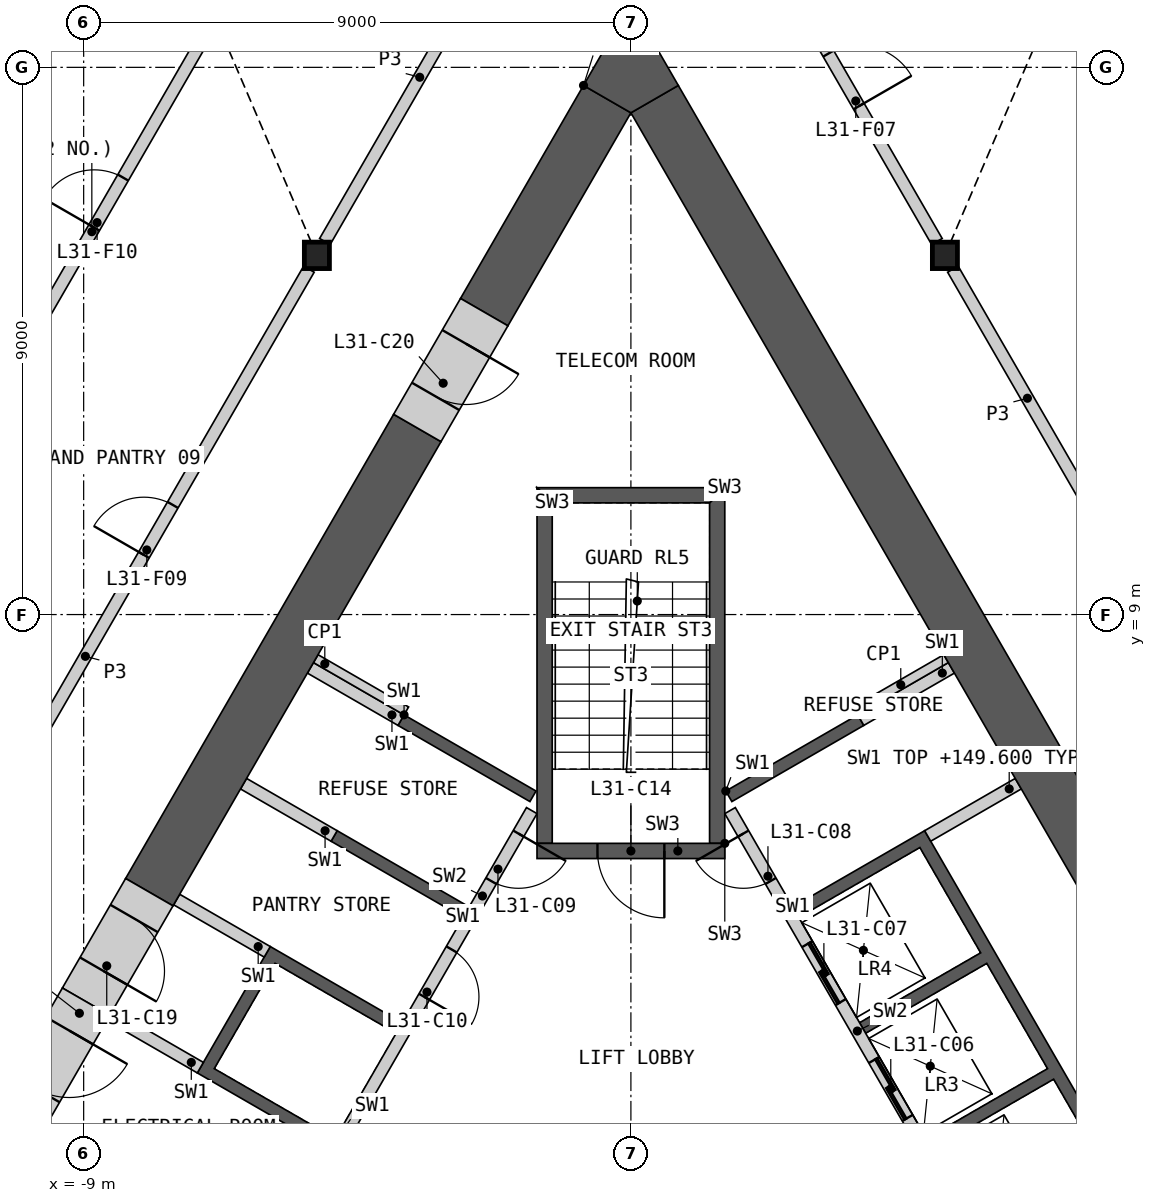
"""IFC4 building model, lengths in metres.
Left out: names, types, materials, properties, quantities, classifications, styles, units other than length and angle.
Written with IfcOpenShell. Run it as: python <this file> out.ifc"""

import sys

from ifc_helpers import new_model, si_unit, direction, frame, frame_2d, origin, origin_2d, place, context, subcontext, project, spatial, polyline, rectangle, i_section, outline, extrude, element, fill, save


model = new_model("IFC4")
c1 = context("Model", 3, precision=1e-05, world=origin(), true_north=direction((0.0, 1.0)))
c2 = subcontext(c1, "Body", "Model", "MODEL_VIEW")
j1 = project(units=[si_unit("LENGTHUNIT", "METRE"), si_unit("PLANEANGLEUNIT", "RADIAN")], contexts=[c1])
p1 = place(None, origin())
s1 = spatial("IfcSite", under=j1, at=p1, CompositionType="ELEMENT")
p2 = place(p1, origin())
s2 = spatial("IfcBuilding", under=s1, at=p2, CompositionType="ELEMENT")
p3 = place(p2, frame((0.0, 0.0, 145.8)))
s3 = spatial("IfcBuildingStorey", under=s2, at=p3, CompositionType="ELEMENT", Elevation=145.8)
for number, where, z_axis, x_axis in (
    (1, (-5.164, 14.908, 0.0), (0.0, 0.0, 1.0), (1.0, 0.0, 0.0)),
    (2, (5.164, 14.908, 0.0), (0.0, 0.0, 1.0), (1.0, 0.0, 0.0)),
):
    element("IfcColumn", number, at=place(p3, frame(where, z_axis=z_axis, x_axis=x_axis)), inside=s3, PredefinedType="COLUMN", context=c2, shape_type="SweptSolid", body=[
        extrude(i_section(OverallWidth=0.412, OverallDepth=0.435, WebThickness=0.036, FlangeThickness=0.057, at=origin_2d()), origin(), (0.0, 0.0, 1.0), 4.2),
    ])
p4 = place(p3, origin())
e3 = element("IfcWall", 3, at=p4, inside=s3, PredefinedType="SHEAR", context=c2, shape_type="SweptSolid", body=[
    extrude(outline(polyline([(1.561, 6.097), (3.731, 7.35), (3.831, 7.177), (1.66, 5.924), (1.561, 6.097)])), origin(), (0.0, 0.0, 1.0), 3.8),
])
p5 = place(p3, origin())
e4 = element("IfcWall", 4, at=p5, inside=s3, PredefinedType="SHEAR", context=c2, shape_type="SweptSolid", body=[
    extrude(outline(polyline([(2.66, 4.192), (4.831, 5.445), (8.231, -0.444), (6.061, -1.697), (5.96, -1.524), (7.952, -0.374), (6.952, 1.358), (4.96, 0.208), (4.861, 0.381), (6.852, 1.531), (5.852, 3.263), (3.861, 2.113), (3.76, 2.287), (5.752, 3.437), (4.752, 5.169), (2.76, 4.019), (2.66, 4.192)])), origin(), (0.0, 0.0, 1.0), 3.8),
])
p6 = place(p3, frame((5.817, -1.476, 0.0), z_axis=(0.0, 0.0, 1.0), x_axis=(-0.500002616675, 0.866023893041, 0.0)))
e5 = element("IfcWall", 5, at=p6, inside=s3, PredefinedType="SOLIDWALL", context=c2, shape_type="SweptSolid", body=[
    extrude(rectangle(XDim=8.373, YDim=0.2, at=frame_2d((4.187, 0.0))), origin(), (0.0, 0.0, 1.0), 3.8),
])
p7 = place(p6, frame((0.337, 0.0, 0.0)))
e6 = element("IfcOpeningElement", 6, at=p7, cuts=e5, PredefinedType="OPENING", context=c2, shape_type="SweptSolid", body=[
    extrude(rectangle(XDim=1.1, YDim=2.1, at=frame_2d((0.55, 1.05))), frame((0.0, 0.11, 0.0), z_axis=(0.0, -1.0, 0.0), x_axis=(1.0, 0.0, 0.0)), (0.0, 0.0, 1.0), 0.22),
])
p8 = place(p6, frame((2.537, 0.0, 0.0)))
e7 = element("IfcOpeningElement", 7, at=p8, cuts=e5, PredefinedType="OPENING", context=c2, shape_type="SweptSolid", body=[
    extrude(rectangle(XDim=1.1, YDim=2.1, at=frame_2d((0.55, 1.05))), frame((0.0, 0.11, 0.0), z_axis=(0.0, -1.0, 0.0), x_axis=(1.0, 0.0, 0.0)), (0.0, 0.0, 1.0), 0.22),
])
p9 = place(p6, frame((4.737, 0.0, 0.0)))
e8 = element("IfcOpeningElement", 8, at=p9, cuts=e5, PredefinedType="OPENING", context=c2, shape_type="SweptSolid", body=[
    extrude(rectangle(XDim=1.1, YDim=2.1, at=frame_2d((0.55, 1.05))), frame((0.0, 0.11, 0.0), z_axis=(0.0, -1.0, 0.0), x_axis=(1.0, 0.0, 0.0)), (0.0, 0.0, 1.0), 0.22),
])
p10 = place(p6, frame((7.037, 0.0, 0.0)))
e9 = element("IfcOpeningElement", 9, at=p10, cuts=e5, PredefinedType="OPENING", context=c2, shape_type="SweptSolid", body=[
    extrude(rectangle(XDim=0.9, YDim=2.1, at=frame_2d((0.45, 1.05))), frame((0.0, 0.11, 0.0), z_axis=(0.0, -1.0, 0.0), x_axis=(1.0, 0.0, 0.0)), (0.0, 0.0, 1.0), 0.22),
])
for number, where, z_axis, x_axis in (
    (10, (4.881, 5.358, 0.0), (0.0, 0.0, 1.0), (0.866, 0.5, 0.0)),
    (11, (3.781, 7.263, 0.0), (0.0, 0.0, 1.0), (0.866, 0.5, 0.0)),
):
    element("IfcWall", number, at=place(p3, frame(where, z_axis=z_axis, x_axis=x_axis)), inside=s3, PredefinedType="SHEAR", context=c2, shape_type="SweptSolid", body=[
        extrude(rectangle(XDim=1.72, YDim=0.2, at=frame_2d((0.86, 0.0))), origin(), (0.0, 0.0, 1.0), 3.8),
    ])
p11 = place(p3, origin())
e12 = element("IfcWall", 12, at=p11, inside=s3, PredefinedType="SHEAR", context=c2, shape_type="SweptSolid", body=[
    extrude(outline(polyline([(-4.96, 0.208), (-7.131, 1.461), (-5.931, 3.54), (-3.76, 2.287), (-3.861, 2.113), (-5.852, 3.263), (-6.852, 1.531), (-4.861, 0.381), (-4.96, 0.208)])), origin(), (0.0, 0.0, 1.0), 3.8),
])
p12 = place(p3, origin())
e13 = element("IfcWall", 13, at=p12, inside=s3, PredefinedType="SHEAR", context=c2, shape_type="SweptSolid", body=[
    extrude(outline(polyline([(-2.76, 4.019), (-4.931, 5.272), (-4.831, 5.445), (-2.66, 4.192), (-2.76, 4.019)])), origin(), (0.0, 0.0, 1.0), 3.8),
])
p13 = place(p3, origin())
e14 = element("IfcWall", 14, at=p13, inside=s3, PredefinedType="SHEAR", context=c2, shape_type="SweptSolid", body=[
    extrude(outline(polyline([(-3.731, 7.35), (-1.561, 6.097), (-1.66, 5.924), (-3.831, 7.177), (-3.731, 7.35)])), origin(), (0.0, 0.0, 1.0), 3.8),
])
p14 = place(p3, frame((-1.631, 5.776, 0.0), z_axis=(0.0, 0.0, 1.0), x_axis=(-0.499992876559, -0.866029516466, 0.0)))
e15 = element("IfcWall", 15, at=p14, inside=s3, PredefinedType="SOLIDWALL", context=c2, shape_type="SweptSolid", body=[
    extrude(rectangle(XDim=6.486, YDim=0.2, at=frame_2d((3.243, 0.0))), origin(), (0.0, 0.0, 1.0), 3.8),
])
p15 = place(p14, frame((0.437, 0.0, 0.0)))
e16 = element("IfcOpeningElement", 16, at=p15, cuts=e15, PredefinedType="OPENING", context=c2, shape_type="SweptSolid", body=[
    extrude(rectangle(XDim=0.9, YDim=2.1, at=frame_2d((0.45, 1.05))), frame((0.0, 0.11, 0.0), z_axis=(0.0, -1.0, 0.0), x_axis=(1.0, 0.0, 0.0)), (0.0, 0.0, 1.0), 0.22),
])
p16 = place(p14, frame((2.637, 0.0, 0.0)))
e17 = element("IfcOpeningElement", 17, at=p16, cuts=e15, PredefinedType="OPENING", context=c2, shape_type="SweptSolid", body=[
    extrude(rectangle(XDim=0.9, YDim=2.1, at=frame_2d((0.45, 1.05))), frame((0.0, 0.11, 0.0), z_axis=(0.0, -1.0, 0.0), x_axis=(1.0, 0.0, 0.0)), (0.0, 0.0, 1.0), 0.22),
])
for number, where, z_axis, x_axis in (
    (18, (-3.781, 7.263, 0.0), (0.0, 0.0, 1.0), (-0.866, 0.5, 0.0)),
    (19, (-4.881, 5.358, 0.0), (0.0, 0.0, 1.0), (-0.866, 0.5, 0.0)),
):
    element("IfcWall", number, at=place(p3, frame(where, z_axis=z_axis, x_axis=x_axis)), inside=s3, PredefinedType="SHEAR", context=c2, shape_type="SweptSolid", body=[
        extrude(rectangle(XDim=1.72, YDim=0.2, at=frame_2d((0.86, 0.0))), origin(), (0.0, 0.0, 1.0), 3.8),
    ])
p17 = place(p3, frame((-5.981, 3.453, 0.0), z_axis=(0.0, 0.0, 1.0), x_axis=(-0.866060346521, 0.499939472521, 0.0)))
e20 = element("IfcWall", 20, at=p17, inside=s3, PredefinedType="SHEAR", context=c2, shape_type="SweptSolid", body=[
    extrude(rectangle(XDim=1.72, YDim=0.2, at=frame_2d((0.86, 0.0))), origin(), (0.0, 0.0, 1.0), 3.8),
])
p18 = place(p3, frame((-7.081, 1.548, 0.0), z_axis=(0.0, 0.0, 1.0), x_axis=(-0.865963414263, 0.500107353632, 0.0)))
e21 = element("IfcWall", 21, at=p18, inside=s3, PredefinedType="SHEAR", context=c2, shape_type="SweptSolid", body=[
    extrude(rectangle(XDim=1.72, YDim=0.2, at=frame_2d((0.86, 0.0))), origin(), (0.0, 0.0, 1.0), 3.8),
])
p19 = place(p3, origin())
e22 = element("IfcWall", 22, at=p19, inside=s3, PredefinedType="SHEAR", context=c2, shape_type="SweptSolid", body=[
    extrude(outline(polyline([(1.544, 5.237), (1.544, 11.087), (1.294, 10.837), (1.294, 5.237), (1.544, 5.237)])), origin(), (0.0, 0.0, 1.0), 3.8),
])
p20 = place(p3, origin())
e23 = element("IfcWall", 23, at=p20, inside=s3, PredefinedType="SHEAR", context=c2, shape_type="SweptSolid", body=[
    extrude(outline(polyline([(1.544, 11.087), (-1.544, 11.087), (-1.294, 10.837), (1.294, 10.837), (1.544, 11.087)])), origin(), (0.0, 0.0, 1.0), 3.8),
])
p21 = place(p3, origin())
e24 = element("IfcWall", 24, at=p21, inside=s3, PredefinedType="SHEAR", context=c2, shape_type="SweptSolid", body=[
    extrude(outline(polyline([(-1.294, 10.837), (-1.544, 11.087), (-1.544, 5.237), (-1.294, 5.237), (-1.294, 10.837)])), origin(), (0.0, 0.0, 1.0), 3.8),
])
p22 = place(p3, frame((1.544, 5.112, 0.0), z_axis=(0.0, 0.0, 1.0), x_axis=(-1.0, 0.0, 0.0)))
e25 = element("IfcWall", 25, at=p22, inside=s3, PredefinedType="SHEAR", context=c2, shape_type="SweptSolid", body=[
    extrude(rectangle(XDim=3.088, YDim=0.25, at=frame_2d((1.544, 0.0))), origin(), (0.0, 0.0, 1.0), 3.8),
])
p23 = place(p22, frame((0.994, 0.0, 0.0)))
e26 = element("IfcOpeningElement", 26, at=p23, cuts=e25, PredefinedType="OPENING", context=c2, shape_type="SweptSolid", body=[
    extrude(rectangle(XDim=1.1, YDim=2.1, at=frame_2d((0.55, 1.05))), frame((0.0, 0.135, 0.0), z_axis=(0.0, -1.0, 0.0), x_axis=(1.0, 0.0, 0.0)), (0.0, 0.0, 1.0), 0.27),
])
for number, where, z_axis, x_axis in (
    (27, (3.693, 7.415, 0.0), (0.0, 0.0, 1.0), (0.866, 0.5, 0.0)),
    (28, (-3.693, 7.415, 0.0), (0.0, 0.0, 1.0), (-0.866, 0.5, 0.0)),
):
    element("IfcWall", number, at=place(p3, frame(where, z_axis=z_axis, x_axis=x_axis)), inside=s3, PredefinedType="PARTITIONING", context=c2, shape_type="SweptSolid", body=[
        extrude(rectangle(XDim=1.72, YDim=0.15, at=frame_2d((0.86, 0.0))), origin(), (0.0, 0.0, 1.0), 3.8),
    ])
p24 = place(p3, frame((8.372, 3.652, 0.0), z_axis=(0.0, 0.0, 1.0), x_axis=(-0.499997808738, 0.866026668906, 0.0)))
e29 = element("IfcWall", 29, at=p24, inside=s3, PredefinedType="SHEAR", context=c2, shape_type="SweptSolid", body=[
    extrude(rectangle(XDim=15.964, YDim=0.9, at=frame_2d((7.982, 0.0))), origin(), (0.0, 0.0, 1.0), 3.8),
])
p25 = place(p3, frame((-3.512, 12.069, 0.0), z_axis=(0.0, 0.0, 1.0), x_axis=(-0.500002126466, -0.866024176065, 0.0)))
e30 = element("IfcWall", 30, at=p25, inside=s3, PredefinedType="SHEAR", context=c2, shape_type="SweptSolid", body=[
    extrude(rectangle(XDim=8.816, YDim=0.9, at=frame_2d((4.408, 0.0))), origin(), (0.0, 0.0, 1.0), 3.8),
])
p26 = place(p3, frame((-0.39, 17.478, 0.0), z_axis=(0.0, 0.0, 1.0), x_axis=(-0.500046330384, -0.865998653272, 0.0)))
e31 = element("IfcWall", 31, at=p26, inside=s3, PredefinedType="SHEAR", context=c2, shape_type="SweptSolid", body=[
    extrude(rectangle(XDim=4.045, YDim=0.9, at=frame_2d((2.023, 0.0))), origin(), (0.0, 0.0, 1.0), 3.8),
])
p27 = place(p3, origin())
e32 = element("IfcWall", 32, at=p27, inside=s3, PredefinedType="SHEAR", context=c2, shape_type="SweptSolid", body=[
    extrude(outline(polyline([(-0.779, 17.703), (0.0, 19.052), (0.779, 17.703), (0.0, 17.253), (-0.779, 17.703)])), origin(), (0.0, 0.0, 1.0), 3.8),
])
p28 = place(p3, frame((-7.92, 4.434, 0.0), z_axis=(0.0, 0.0, 1.0), x_axis=(-0.499939227269, -0.866060488094, 0.0)))
e33 = element("IfcWall", 33, at=p28, inside=s3, PredefinedType="SHEAR", context=c2, shape_type="SweptSolid", body=[
    extrude(rectangle(XDim=2.08, YDim=0.9, at=frame_2d((1.04, 0.0))), origin(), (0.0, 0.0, 1.0), 3.8),
])
p29 = place(p28, frame((0.5, 0.0, 0.0)))
e34 = element("IfcOpeningElement", 34, at=p29, cuts=e33, PredefinedType="OPENING", context=c2, shape_type="SweptSolid", body=[
    extrude(rectangle(XDim=1.0, YDim=2.1, at=frame_2d((0.5, 1.05))), frame((0.0, 0.46, 0.0), z_axis=(0.0, -1.0, 0.0), x_axis=(1.0, 0.0, 0.0)), (0.0, 0.0, 1.0), 0.92),
])
p30 = place(p3, frame((-2.413, 13.974, 0.0), z_axis=(0.0, 0.0, 1.0), x_axis=(-0.499946605688, -0.86605622881, 0.0)))
e35 = element("IfcWall", 35, at=p30, inside=s3, PredefinedType="SHEAR", context=c2, shape_type="SweptSolid", body=[
    extrude(rectangle(XDim=2.2, YDim=0.9, at=frame_2d((1.1, 0.0))), origin(), (0.0, 0.0, 1.0), 3.8),
])
p31 = place(p30, frame((0.6, 0.0, 0.0)))
e36 = element("IfcOpeningElement", 36, at=p31, cuts=e35, PredefinedType="OPENING", context=c2, shape_type="SweptSolid", body=[
    extrude(rectangle(XDim=1.0, YDim=2.1, at=frame_2d((0.5, 1.05))), frame((0.0, 0.46, 0.0), z_axis=(0.0, -1.0, 0.0), x_axis=(1.0, 0.0, 0.0)), (0.0, 0.0, 1.0), 0.92),
])
p32 = place(p3, frame((-8.96, 2.633, 0.0), z_axis=(0.0, 0.0, 1.0), x_axis=(-0.50002983664, -0.866008176907, 0.0)))
e37 = element("IfcWall", 37, at=p32, inside=s3, PredefinedType="SHEAR", context=c2, shape_type="SweptSolid", body=[
    extrude(rectangle(XDim=2.2, YDim=0.9, at=frame_2d((1.1, 0.0))), origin(), (0.0, 0.0, 1.0), 3.8),
])
p33 = place(p32, frame((0.55, 0.0, 0.0)))
e38 = element("IfcOpeningElement", 38, at=p33, cuts=e37, PredefinedType="OPENING", context=c2, shape_type="SweptSolid", body=[
    extrude(rectangle(XDim=1.1, YDim=2.1, at=frame_2d((0.55, 1.05))), frame((0.0, 0.46, 0.0), z_axis=(0.0, -1.0, 0.0), x_axis=(1.0, 0.0, 0.0)), (0.0, 0.0, 1.0), 0.92),
])
p34 = place(p3, frame((5.295, 14.68, 0.0), z_axis=(0.0, 0.0, 1.0), x_axis=(0.500012035596, -0.866018454918, 0.0)))
e39 = element("IfcWall", 39, at=p34, inside=s3, PredefinedType="PARTITIONING", context=c2, shape_type="SweptSolid", body=[
    extrude(rectangle(XDim=9.803, YDim=0.2, at=frame_2d((4.902, 0.0))), origin(), (0.0, 0.0, 1.0), 3.8),
])
p35 = place(p34, frame((6.853, 0.0, 0.0)))
e40 = element("IfcOpeningElement", 40, at=p35, cuts=e39, PredefinedType="OPENING", context=c2, shape_type="SweptSolid", body=[
    extrude(rectangle(XDim=1.0, YDim=2.1, at=frame_2d((0.5, 1.05))), frame((0.0, 0.11, 0.0), z_axis=(0.0, -1.0, 0.0), x_axis=(1.0, 0.0, 0.0)), (0.0, 0.0, 1.0), 0.22),
])
p36 = place(p3, frame((-10.197, 6.19, 0.0), z_axis=(0.0, 0.0, 1.0), x_axis=(0.500012035596, 0.866018454918, 0.0)))
e41 = element("IfcWall", 41, at=p36, inside=s3, PredefinedType="PARTITIONING", context=c2, shape_type="SweptSolid", body=[
    extrude(rectangle(XDim=9.803, YDim=0.2, at=frame_2d((4.902, 0.0))), origin(), (0.0, 0.0, 1.0), 3.8),
])
p37 = place(p36, frame((4.376, 0.0, 0.0)))
e42 = element("IfcOpeningElement", 42, at=p37, cuts=e41, PredefinedType="OPENING", context=c2, shape_type="SweptSolid", body=[
    extrude(rectangle(XDim=0.95, YDim=2.1, at=frame_2d((0.475, 1.05))), frame((0.0, 0.11, 0.0), z_axis=(0.0, -1.0, 0.0), x_axis=(1.0, 0.0, 0.0)), (0.0, 0.0, 1.0), 0.22),
])
p38 = place(p3, frame((-5.033, 15.135, 0.0), z_axis=(0.0, 0.0, 1.0), x_axis=(0.499980978912, 0.866036385336, 0.0)))
e43 = element("IfcWall", 43, at=p38, inside=s3, PredefinedType="PARTITIONING", context=c2, shape_type="SweptSolid", body=[
    extrude(rectangle(XDim=6.24, YDim=0.2, at=frame_2d((3.12, 0.0))), origin(), (0.0, 0.0, 1.0), 3.8),
])
p39 = place(p3, frame((1.913, 20.539, 0.0), z_axis=(0.0, 0.0, 1.0), x_axis=(0.499980978912, -0.866036385336, 0.0)))
e44 = element("IfcWall", 44, at=p39, inside=s3, PredefinedType="PARTITIONING", context=c2, shape_type="SweptSolid", body=[
    extrude(rectangle(XDim=6.24, YDim=0.2, at=frame_2d((3.12, 0.0))), origin(), (0.0, 0.0, 1.0), 3.8),
])
p40 = place(p39, frame((2.67, 0.0, 0.0)))
e45 = element("IfcOpeningElement", 45, at=p40, cuts=e44, PredefinedType="OPENING", context=c2, shape_type="SweptSolid", body=[
    extrude(rectangle(XDim=1.0, YDim=2.1, at=frame_2d((0.5, 1.05))), frame((0.0, 0.11, 0.0), z_axis=(0.0, -1.0, 0.0), x_axis=(1.0, 0.0, 0.0)), (0.0, 0.0, 1.0), 0.22),
])
p41 = place(p3, frame((-13.223, 7.75, 0.0), z_axis=(0.0, 0.0, 1.0), x_axis=(0.499991226912, 0.86603046887, 0.0)))
e46 = element("IfcWall", 46, at=p41, inside=s3, PredefinedType="PARTITIONING", context=c2, shape_type="SweptSolid", body=[
    extrude(rectangle(XDim=17.429, YDim=0.2, at=frame_2d((8.715, 0.0))), origin(), (0.0, 0.0, 1.0), 2.885),
])
p42 = place(p41, frame((8.792, 0.0, 0.0)))
e47 = element("IfcOpeningElement", 47, at=p42, cuts=e46, PredefinedType="OPENING", context=c2, shape_type="SweptSolid", body=[
    extrude(rectangle(XDim=0.95, YDim=2.1, at=frame_2d((0.475, 1.05))), frame((0.0, 0.11, 0.0), z_axis=(0.0, -1.0, 0.0), x_axis=(1.0, 0.0, 0.0)), (0.0, 0.0, 1.0), 0.22),
])
p43 = place(p8, origin())
e48 = element("IfcDoor", 48, at=p43, inside=s3, OperationType="SLIDING_TO_LEFT", PredefinedType="DOOR", context=c2, shape_type="SweptSolid", body=[
    extrude(rectangle(XDim=1.1, YDim=2.1, at=frame_2d((0.55, 1.05))), frame((0.0, 0.025, 0.0), z_axis=(0.0, -1.0, 0.0), x_axis=(1.0, 0.0, 0.0)), (0.0, 0.0, 1.0), 0.05),
])
fill(e7, e48)
p44 = place(p9, origin())
e49 = element("IfcDoor", 49, at=p44, inside=s3, OperationType="SLIDING_TO_LEFT", PredefinedType="DOOR", context=c2, shape_type="SweptSolid", body=[
    extrude(rectangle(XDim=1.1, YDim=2.1, at=frame_2d((0.55, 1.05))), frame((0.0, 0.025, 0.0), z_axis=(0.0, -1.0, 0.0), x_axis=(1.0, 0.0, 0.0)), (0.0, 0.0, 1.0), 0.05),
])
fill(e8, e49)
p45 = place(p10, origin())
e50 = element("IfcDoor", 50, at=p45, inside=s3, OperationType="SINGLE_SWING_RIGHT", PredefinedType="DOOR", context=c2, shape_type="SweptSolid", body=[
    extrude(rectangle(XDim=0.9, YDim=2.1, at=frame_2d((0.45, 1.05))), frame((0.0, 0.025, 0.0), z_axis=(0.0, -1.0, 0.0), x_axis=(1.0, 0.0, 0.0)), (0.0, 0.0, 1.0), 0.05),
])
fill(e9, e50)
p46 = place(p15, origin())
e51 = element("IfcDoor", 51, at=p46, inside=s3, OperationType="SINGLE_SWING_LEFT", PredefinedType="DOOR", context=c2, shape_type="SweptSolid", body=[
    extrude(rectangle(XDim=0.9, YDim=2.1, at=frame_2d((0.45, 1.05))), frame((0.0, 0.025, 0.0), z_axis=(0.0, -1.0, 0.0), x_axis=(1.0, 0.0, 0.0)), (0.0, 0.0, 1.0), 0.05),
])
fill(e16, e51)
p47 = place(p16, origin())
e52 = element("IfcDoor", 52, at=p47, inside=s3, OperationType="SINGLE_SWING_RIGHT", PredefinedType="DOOR", context=c2, shape_type="SweptSolid", body=[
    extrude(rectangle(XDim=0.9, YDim=2.1, at=frame_2d((0.45, 1.05))), frame((0.0, 0.025, 0.0), z_axis=(0.0, -1.0, 0.0), x_axis=(1.0, 0.0, 0.0)), (0.0, 0.0, 1.0), 0.05),
])
fill(e17, e52)
p48 = place(p23, origin())
e53 = element("IfcDoor", 53, at=p48, inside=s3, OperationType="SINGLE_SWING_LEFT", PredefinedType="DOOR", context=c2, shape_type="SweptSolid", body=[
    extrude(rectangle(XDim=1.1, YDim=2.1, at=frame_2d((0.55, 1.05))), frame((0.0, 0.025, 0.0), z_axis=(0.0, -1.0, 0.0), x_axis=(1.0, 0.0, 0.0)), (0.0, 0.0, 1.0), 0.05),
])
fill(e26, e53)
p49 = place(p29, origin())
e54 = element("IfcDoor", 54, at=p49, inside=s3, OperationType="SINGLE_SWING_RIGHT", PredefinedType="DOOR", context=c2, shape_type="SweptSolid", body=[
    extrude(rectangle(XDim=1.0, YDim=2.1, at=frame_2d((0.5, 1.05))), frame((0.0, 0.205, 0.0), z_axis=(0.0, -1.0, 0.0), x_axis=(1.0, 0.0, 0.0)), (0.0, 0.0, 1.0), 0.05),
])
fill(e34, e54)
p50 = place(p31, origin())
e55 = element("IfcDoor", 55, at=p50, inside=s3, OperationType="SINGLE_SWING_LEFT", PredefinedType="DOOR", context=c2, shape_type="SweptSolid", body=[
    extrude(rectangle(XDim=1.0, YDim=2.1, at=frame_2d((0.5, 1.05))), frame((0.0, 0.205, 0.0), z_axis=(0.0, -1.0, 0.0), x_axis=(1.0, 0.0, 0.0)), (0.0, 0.0, 1.0), 0.05),
])
fill(e36, e55)
p51 = place(p33, origin())
e56 = element("IfcDoor", 56, at=p51, inside=s3, OperationType="SINGLE_SWING_LEFT", PredefinedType="DOOR", context=c2, shape_type="SweptSolid", body=[
    extrude(rectangle(XDim=1.1, YDim=2.1, at=frame_2d((0.55, 1.05))), frame((0.0, 0.205, 0.0), z_axis=(0.0, -1.0, 0.0), x_axis=(1.0, 0.0, 0.0)), (0.0, 0.0, 1.0), 0.05),
])
fill(e38, e56)
p52 = place(p40, origin())
e57 = element("IfcDoor", 57, at=p52, inside=s3, OperationType="SINGLE_SWING_RIGHT", PredefinedType="DOOR", context=c2, shape_type="SweptSolid", body=[
    extrude(rectangle(XDim=1.0, YDim=2.1, at=frame_2d((0.5, 1.05))), frame((0.0, 0.025, 0.0), z_axis=(0.0, -1.0, 0.0), x_axis=(1.0, 0.0, 0.0)), (0.0, 0.0, 1.0), 0.05),
])
fill(e45, e57)
p53 = place(p37, origin())
e58 = element("IfcDoor", 58, at=p53, inside=s3, OperationType="SINGLE_SWING_LEFT", PredefinedType="DOOR", context=c2, shape_type="SweptSolid", body=[
    extrude(rectangle(XDim=0.95, YDim=2.1, at=frame_2d((0.475, 1.05))), frame((0.0, 0.025, 0.0), z_axis=(0.0, -1.0, 0.0), x_axis=(1.0, 0.0, 0.0)), (0.0, 0.0, 1.0), 0.05),
])
fill(e42, e58)
p54 = place(p42, origin())
e59 = element("IfcDoor", 59, at=p54, inside=s3, OperationType="SINGLE_SWING_LEFT", PredefinedType="DOOR", context=c2, shape_type="SweptSolid", body=[
    extrude(rectangle(XDim=0.95, YDim=2.1, at=frame_2d((0.475, 1.05))), frame((0.0, 0.025, 0.0), z_axis=(0.0, -1.0, 0.0), x_axis=(1.0, 0.0, 0.0)), (0.0, 0.0, 1.0), 0.05),
])
fill(e47, e59)
save(model, sys.argv[1])
